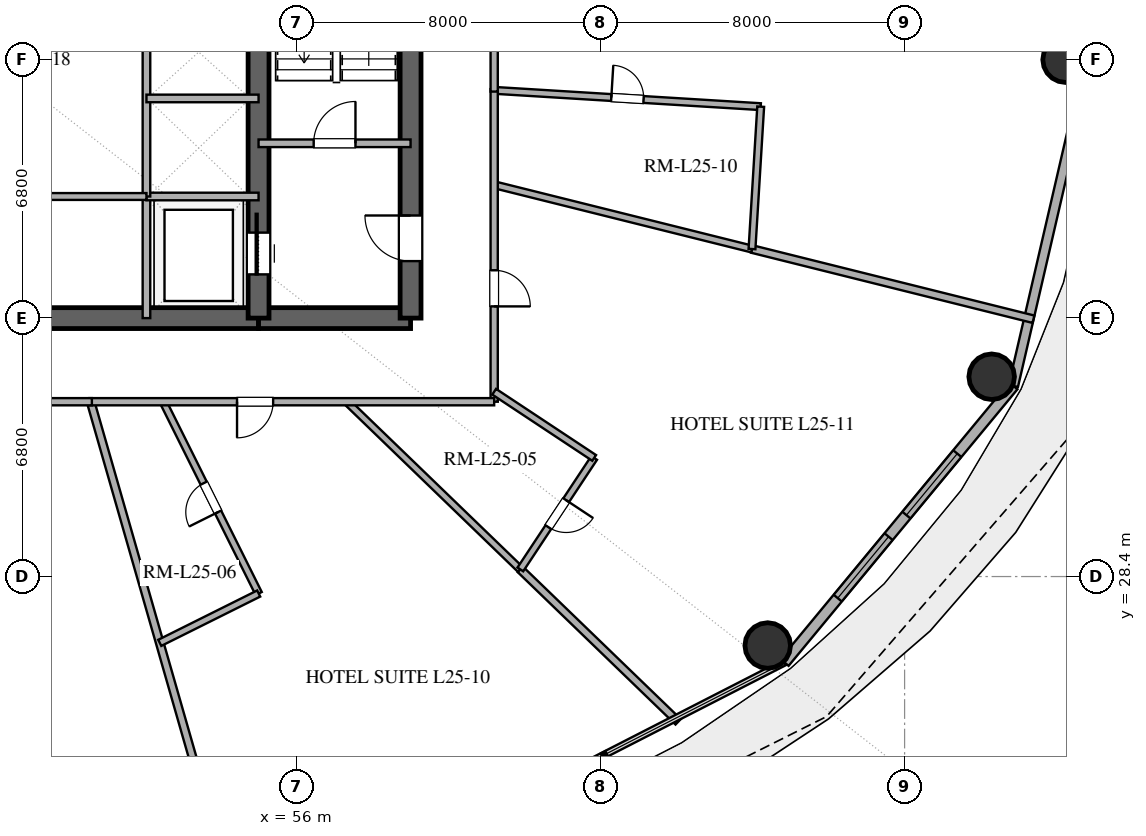
"""IFC4 building model, lengths in metres.
Left out: names, types, materials, properties, quantities, classifications, styles, units other than length and angle.
Written with IfcOpenShell. Run it as: python <this file> out.ifc"""

import sys

from ifc_helpers import new_model, si_unit, direction, frame, frame_2d, origin, origin_2d, place, context, subcontext, project, spatial, rectangle, hollow_circle, extrude, element, fill, save


model = new_model("IFC4")
c1 = context("Model", 3, precision=1e-05, world=origin(), true_north=direction((0.0, 1.0)))
c2 = subcontext(c1, "Body", "Model", "MODEL_VIEW")
j1 = project(units=[si_unit("LENGTHUNIT", "METRE"), si_unit("PLANEANGLEUNIT", "RADIAN")], contexts=[c1])
p1 = place(None, origin())
s1 = spatial("IfcSite", under=j1, at=p1, CompositionType="ELEMENT")
p2 = place(p1, origin())
s2 = spatial("IfcBuilding", under=s1, at=p2, CompositionType="ELEMENT")
p3 = place(p2, frame((0.0, 0.0, 102.0)))
s3 = spatial("IfcBuildingStorey", under=s2, at=p3, CompositionType="ELEMENT", Elevation=102.0)
p4 = place(p3, frame((41.0, 35.2, 0.0), z_axis=(0.0, 0.0, 1.0), x_axis=(1.0, 0.0, 0.0)))
e1 = element("IfcWall", 1, at=p4, inside=s3, PredefinedType="SHEAR", context=c2, shape_type="SweptSolid", body=[
    extrude(rectangle(XDim=14.0, YDim=0.55, at=frame_2d((7.0, 0.0))), origin(), (0.0, 0.0, 1.0), 3.38),
])
p5 = place(p4, frame((6.1, 0.0, 0.0)))
e2 = element("IfcOpeningElement", 2, at=p5, cuts=e1, PredefinedType="OPENING", context=c2, shape_type="SweptSolid", body=[
    extrude(rectangle(XDim=1.8, YDim=2.25, at=frame_2d((0.9, 1.125))), frame((0.0, 0.285, 0.0), z_axis=(0.0, -1.0, 0.0), x_axis=(1.0, 0.0, 0.0)), (0.0, 0.0, 1.0), 0.57),
])
p6 = place(p3, frame((55.0, 35.2, 0.0), z_axis=(0.0, 0.0, 1.0), x_axis=(1.0, 0.0, 0.0)))
e3 = element("IfcWall", 3, at=p6, inside=s3, PredefinedType="SHEAR", context=c2, shape_type="SweptSolid", body=[
    extrude(rectangle(XDim=4.0, YDim=0.55, at=frame_2d((2.0, 0.0))), origin(), (0.0, 0.0, 1.0), 3.38),
])
p7 = place(p3, frame((59.0, 35.2, 0.0), z_axis=(0.0, 0.0, 1.0), x_axis=(0.0, 1.0, 0.0)))
e4 = element("IfcWall", 4, at=p7, inside=s3, PredefinedType="SHEAR", context=c2, shape_type="SweptSolid", body=[
    extrude(rectangle(XDim=13.6, YDim=0.55, at=frame_2d((6.8, 0.0))), origin(), (0.0, 0.0, 1.0), 3.38),
])
p8 = place(p7, frame((1.5, 0.0, 0.0)))
e5 = element("IfcOpeningElement", 5, at=p8, cuts=e4, PredefinedType="OPENING", context=c2, shape_type="SweptSolid", body=[
    extrude(rectangle(XDim=1.2, YDim=2.15, at=frame_2d((0.6, 1.075))), frame((0.0, 0.285, 0.0), z_axis=(0.0, -1.0, 0.0), x_axis=(1.0, 0.0, 0.0)), (0.0, 0.0, 1.0), 0.57),
])
p9 = place(p3, frame((55.0, 35.2, 0.0), z_axis=(0.0, 0.0, 1.0), x_axis=(0.0, 1.0, 0.0)))
e6 = element("IfcWall", 6, at=p9, inside=s3, PredefinedType="SHEAR", context=c2, shape_type="SweptSolid", body=[
    extrude(rectangle(XDim=13.6, YDim=0.55, at=frame_2d((6.8, 0.0))), origin(), (0.0, 0.0, 1.0), 3.38),
])
p10 = place(p9, frame((1.15, 0.0, 0.0)))
e7 = element("IfcOpeningElement", 7, at=p10, cuts=e6, PredefinedType="OPENING", context=c2, shape_type="SweptSolid", body=[
    extrude(rectangle(XDim=1.1, YDim=2.2, at=frame_2d((0.55, 1.1))), frame((0.0, 0.285, 0.0), z_axis=(0.0, -1.0, 0.0), x_axis=(1.0, 0.0, 0.0)), (0.0, 0.0, 1.0), 0.57),
])
for number, where, z_axis, x_axis in (
    (8, (76.237, 42.0, 0.0), (0.0, 0.0, 1.0), (1.0, 0.0, 0.0)),
    (9, (68.398, 26.585, 0.0), (0.0, 0.0, 1.0), (1.0, 0.0, 0.0)),
    (10, (74.291, 33.657, 0.0), (0.0, 0.0, 1.0), (1.0, 0.0, 0.0)),
):
    element("IfcColumn", number, at=place(p3, frame(where, z_axis=z_axis, x_axis=x_axis)), inside=s3, PredefinedType="COLUMN", context=c2, shape_type="SweptSolid", body=[
        extrude(hollow_circle(Radius=0.6, WallThickness=0.032, at=origin_2d()), origin(), (0.0, 0.0, 1.0), 3.38),
    ])
p11 = place(p3, frame((76.849, 42.0, 0.0), z_axis=(0.0, 0.0, 1.0), x_axis=(-0.22558597182, 0.974223264616, 0.0)))
e11 = element("IfcWall", 11, at=p11, inside=s3, PredefinedType="SOLIDWALL", context=c2, shape_type="SweptSolid", body=[
    extrude(rectangle(XDim=8.811, YDim=0.28, at=frame_2d((4.405, 0.0))), origin(), (0.0, 0.0, 1.0), 3.38),
])
p12 = place(p11, frame((5.875, 0.0, 0.0)))
e12 = element("IfcOpeningElement", 12, at=p12, cuts=e11, PredefinedType="OPENING", context=c2, shape_type="SweptSolid", body=[
    extrude(rectangle(XDim=1.4, YDim=2.2, at=frame_2d((0.7, 1.1))), frame((0.0, 0.15, 0.0), z_axis=(0.0, -1.0, 0.0), x_axis=(1.0, 0.0, 0.0)), (0.0, 0.0, 1.0), 0.3),
])
p13 = place(p3, frame((68.84, 26.14, 0.0), z_axis=(0.0, 0.0, 1.0), x_axis=(0.637505817448, 0.770445541696, 0.0)))
e13 = element("IfcWall", 13, at=p13, inside=s3, PredefinedType="SOLIDWALL", context=c2, shape_type="SweptSolid", body=[
    extrude(rectangle(XDim=9.445, YDim=0.28, at=frame_2d((4.723, 0.0))), origin(), (0.0, 0.0, 1.0), 3.38),
])
p14 = place(p13, frame((2.197, 0.0, 0.85)))
e14 = element("IfcOpeningElement", 14, at=p14, cuts=e13, PredefinedType="OPENING", context=c2, shape_type="SweptSolid", body=[
    extrude(rectangle(XDim=2.1, YDim=2.2, at=frame_2d((1.05, 1.1))), frame((0.0, 0.15, 0.0), z_axis=(0.0, -1.0, 0.0), x_axis=(1.0, 0.0, 0.0)), (0.0, 0.0, 1.0), 0.3),
])
p15 = place(p13, frame((5.032, 0.0, 0.85)))
e15 = element("IfcOpeningElement", 15, at=p15, cuts=e13, PredefinedType="OPENING", context=c2, shape_type="SweptSolid", body=[
    extrude(rectangle(XDim=2.1, YDim=2.2, at=frame_2d((1.05, 1.1))), frame((0.0, 0.15, 0.0), z_axis=(0.0, -1.0, 0.0), x_axis=(1.0, 0.0, 0.0)), (0.0, 0.0, 1.0), 0.3),
])
p16 = place(p3, frame((74.861, 33.417, 0.0), z_axis=(0.0, 0.0, 1.0), x_axis=(0.22558597182, 0.974223264616, 0.0)))
e16 = element("IfcWall", 16, at=p16, inside=s3, PredefinedType="SOLIDWALL", context=c2, shape_type="SweptSolid", body=[
    extrude(rectangle(XDim=8.811, YDim=0.25, at=frame_2d((4.405, 0.0))), origin(), (0.0, 0.0, 1.0), 3.38),
])
p17 = place(p3, frame((55.0, 39.8, 0.0), z_axis=(0.0, 0.0, 1.0), x_axis=(1.0, 0.0, 0.0)))
e17 = element("IfcWall", 17, at=p17, inside=s3, PredefinedType="SOLIDWALL", context=c2, shape_type="SweptSolid", body=[
    extrude(rectangle(XDim=4.0, YDim=0.2, at=frame_2d((2.0, 0.0))), origin(), (0.0, 0.0, 1.0), 2.74),
])
p18 = place(p17, frame((1.45, 0.0, 0.0)))
e18 = element("IfcOpeningElement", 18, at=p18, cuts=e17, PredefinedType="OPENING", context=c2, shape_type="SweptSolid", body=[
    extrude(rectangle(XDim=1.1, YDim=2.15, at=frame_2d((0.55, 1.075))), frame((0.0, 0.11, 0.0), z_axis=(0.0, -1.0, 0.0), x_axis=(1.0, 0.0, 0.0)), (0.0, 0.0, 1.0), 0.22),
])
p19 = place(p3, frame((52.05, 35.2, 0.0), z_axis=(0.0, 0.0, 1.0), x_axis=(0.0, 1.0, 0.0)))
e19 = element("IfcWall", 19, at=p19, inside=s3, PredefinedType="SOLIDWALL", context=c2, shape_type="SweptSolid", body=[
    extrude(rectangle(XDim=3.2, YDim=0.2, at=frame_2d((1.6, 0.0))), origin(), (0.0, 0.0, 1.0), 2.74),
])
p20 = place(p3, frame((52.05, 38.4, 0.0), z_axis=(0.0, 0.0, 1.0), x_axis=(1.0, 0.0, 0.0)))
e20 = element("IfcWall", 20, at=p20, inside=s3, PredefinedType="SOLIDWALL", context=c2, shape_type="SweptSolid", body=[
    extrude(rectangle(XDim=2.95, YDim=0.2, at=frame_2d((1.475, 0.0))), origin(), (0.0, 0.0, 1.0), 2.74),
])
p21 = place(p3, frame((52.05, 38.4, 0.0), z_axis=(0.0, 0.0, 1.0), x_axis=(0.0, 1.0, 0.0)))
e21 = element("IfcWall", 21, at=p21, inside=s3, PredefinedType="SOLIDWALL", context=c2, shape_type="SweptSolid", body=[
    extrude(rectangle(XDim=10.4, YDim=0.2, at=frame_2d((5.2, 0.0))), origin(), (0.0, 0.0, 1.0), 2.74),
])
p22 = place(p21, frame((8.2, 0.0, 0.0)))
e22 = element("IfcOpeningElement", 22, at=p22, cuts=e21, PredefinedType="OPENING", context=c2, shape_type="SweptSolid", body=[
    extrude(rectangle(XDim=1.2, YDim=2.2, at=frame_2d((0.6, 1.1))), frame((0.0, 0.11, 0.0), z_axis=(0.0, -1.0, 0.0), x_axis=(1.0, 0.0, 0.0)), (0.0, 0.0, 1.0), 0.22),
])
p23 = place(p3, frame((52.05, 40.98, 0.0), z_axis=(0.0, 0.0, 1.0), x_axis=(1.0, 0.0, 0.0)))
e23 = element("IfcWall", 23, at=p23, inside=s3, PredefinedType="SOLIDWALL", context=c2, shape_type="SweptSolid", body=[
    extrude(rectangle(XDim=2.95, YDim=0.2, at=frame_2d((1.475, 0.0))), origin(), (0.0, 0.0, 1.0), 2.74),
])
p24 = place(p3, frame((49.2, 38.4, 0.0), z_axis=(0.0, 0.0, 1.0), x_axis=(1.0, 0.0, 0.0)))
e24 = element("IfcWall", 24, at=p24, inside=s3, PredefinedType="PLUMBINGWALL", context=c2, shape_type="SweptSolid", body=[
    extrude(rectangle(XDim=2.85, YDim=0.18, at=frame_2d((1.425, 0.0))), origin(), (0.0, 0.0, 1.0), 2.74),
])
p25 = place(p3, frame((75.391, 35.171, 0.0), z_axis=(0.0, 0.0, 1.0), x_axis=(-0.970302209845, 0.241895889938, 0.0)))
e25 = element("IfcWall", 25, at=p25, inside=s3, PredefinedType="PARTITIONING", context=c2, shape_type="SweptSolid", body=[
    extrude(rectangle(XDim=7.633, YDim=0.2, at=frame_2d((3.817, 0.0))), origin(), (0.0, 0.0, 1.0), 2.74),
])
p26 = place(p3, frame((61.2, 41.193, 0.0), z_axis=(0.0, 0.0, 1.0), x_axis=(0.998134708281, -0.061050013314, 0.0)))
e26 = element("IfcWall", 26, at=p26, inside=s3, PredefinedType="PLUMBINGWALL", context=c2, shape_type="SweptSolid", body=[
    extrude(rectangle(XDim=7.026, YDim=0.18, at=frame_2d((3.513, 0.0))), origin(), (0.0, 0.0, 1.0), 2.74),
])
p27 = place(p26, frame((3.088, 0.0, 0.0)))
e27 = element("IfcOpeningElement", 27, at=p27, cuts=e26, PredefinedType="OPENING", context=c2, shape_type="SweptSolid", body=[
    extrude(rectangle(XDim=0.85, YDim=2.1, at=frame_2d((0.425, 1.05))), frame((0.0, 0.1, 0.0), z_axis=(0.0, -1.0, 0.0), x_axis=(1.0, 0.0, 0.0)), (0.0, 0.0, 1.0), 0.2),
])
p28 = place(p3, frame((67.984, 37.017, 0.0), z_axis=(0.0, 0.0, 1.0), x_axis=(-0.970290206094, 0.241944034764, 0.0)))
e28 = element("IfcWall", 28, at=p28, inside=s3, PredefinedType="PLUMBINGWALL", context=c2, shape_type="SweptSolid", body=[
    extrude(rectangle(XDim=6.992, YDim=0.18, at=frame_2d((3.496, 0.0))), origin(), (0.0, 0.0, 1.0), 2.74),
])
p29 = place(p3, frame((50.581, 33.0, 0.0), z_axis=(0.0, 0.0, 1.0), x_axis=(0.275639731411, -0.961261014745, 0.0)))
e29 = element("IfcWall", 29, at=p29, inside=s3, PredefinedType="PARTITIONING", context=c2, shape_type="SweptSolid", body=[
    extrude(rectangle(XDim=13.126, YDim=0.2, at=frame_2d((6.563, 0.0))), origin(), (0.0, 0.0, 1.0), 2.74),
])
p30 = place(p3, frame((61.889, 28.587, 0.0), z_axis=(0.0, 0.0, 1.0), x_axis=(-0.719318009274, 0.694680935059, 0.0)))
e30 = element("IfcWall", 30, at=p30, inside=s3, PredefinedType="PLUMBINGWALL", context=c2, shape_type="SweptSolid", body=[
    extrude(rectangle(XDim=6.352, YDim=0.18, at=frame_2d((3.176, 0.0))), origin(), (0.0, 0.0, 1.0), 2.74),
])
p31 = place(p3, frame((66.041, 24.578, 0.0), z_axis=(0.0, 0.0, 1.0), x_axis=(-0.719370121813, 0.694626970281, 0.0)))
e31 = element("IfcWall", 31, at=p31, inside=s3, PredefinedType="PARTITIONING", context=c2, shape_type="SweptSolid", body=[
    extrude(rectangle(XDim=5.772, YDim=0.2, at=frame_2d((2.886, 0.0))), origin(), (0.0, 0.0, 1.0), 2.74),
])
p32 = place(p3, frame((55.003, 27.953, 0.0), z_axis=(0.0, 0.0, 1.0), x_axis=(-0.446174269641, 0.894946099556, 0.0)))
e32 = element("IfcWall", 32, at=p32, inside=s3, PredefinedType="PLUMBINGWALL", context=c2, shape_type="SweptSolid", body=[
    extrude(rectangle(XDim=5.639, YDim=0.18, at=frame_2d((2.82, 0.0))), origin(), (0.0, 0.0, 1.0), 2.74),
])
p33 = place(p32, frame((2.395, 0.0, 0.0)))
e33 = element("IfcOpeningElement", 33, at=p33, cuts=e32, PredefinedType="OPENING", context=c2, shape_type="SweptSolid", body=[
    extrude(rectangle(XDim=0.85, YDim=2.1, at=frame_2d((0.425, 1.05))), frame((0.0, 0.1, 0.0), z_axis=(0.0, -1.0, 0.0), x_axis=(1.0, 0.0, 0.0)), (0.0, 0.0, 1.0), 0.2),
])
p34 = place(p3, frame((61.2, 41.225, 0.0), z_axis=(0.0, 0.0, 1.0), x_axis=(0.0, -1.0, 0.0)))
e34 = element("IfcWall", 34, at=p34, inside=s3, PredefinedType="PARTITIONING", context=c2, shape_type="SweptSolid", body=[
    extrude(rectangle(XDim=8.225, YDim=0.19, at=frame_2d((4.112, 0.0))), origin(), (0.0, 0.0, 1.0), 2.74),
])
p35 = place(p34, frame((4.767, 0.0, 0.0)))
e35 = element("IfcOpeningElement", 35, at=p35, cuts=e34, PredefinedType="OPENING", context=c2, shape_type="SweptSolid", body=[
    extrude(rectangle(XDim=0.95, YDim=2.15, at=frame_2d((0.475, 1.075))), frame((0.0, 0.105, 0.0), z_axis=(0.0, -1.0, 0.0), x_axis=(1.0, 0.0, 0.0)), (0.0, 0.0, 1.0), 0.21),
])
p36 = place(p3, frame((61.2, 33.0, 0.0), z_axis=(0.0, 0.0, 1.0), x_axis=(-1.0, 0.0, 0.0)))
e36 = element("IfcWall", 36, at=p36, inside=s3, PredefinedType="PARTITIONING", context=c2, shape_type="SweptSolid", body=[
    extrude(rectangle(XDim=10.653, YDim=0.19, at=frame_2d((5.326, 0.0))), origin(), (0.0, 0.0, 1.0), 2.74),
])
p37 = place(p36, frame((5.816, 0.0, 0.0)))
e37 = element("IfcOpeningElement", 37, at=p37, cuts=e36, PredefinedType="OPENING", context=c2, shape_type="SweptSolid", body=[
    extrude(rectangle(XDim=0.95, YDim=2.15, at=frame_2d((0.475, 1.075))), frame((0.0, 0.105, 0.0), z_axis=(0.0, -1.0, 0.0), x_axis=(1.0, 0.0, 0.0)), (0.0, 0.0, 1.0), 0.21),
])
p38 = place(p3, frame((61.2, 51.0, 0.0), z_axis=(0.0, 0.0, 1.0), x_axis=(0.0, -1.0, 0.0)))
e38 = element("IfcWall", 38, at=p38, inside=s3, PredefinedType="PARTITIONING", context=c2, shape_type="SweptSolid", body=[
    extrude(rectangle(XDim=9.839, YDim=0.19, at=frame_2d((4.92, 0.0))), origin(), (0.0, 0.0, 1.0), 2.74),
])
p39 = place(p38, frame((7.035, 0.0, 0.0)))
e39 = element("IfcOpeningElement", 39, at=p39, cuts=e38, PredefinedType="OPENING", context=c2, shape_type="SweptSolid", body=[
    extrude(rectangle(XDim=0.95, YDim=2.15, at=frame_2d((0.475, 1.075))), frame((0.0, 0.105, 0.0), z_axis=(0.0, -1.0, 0.0), x_axis=(1.0, 0.0, 0.0)), (0.0, 0.0, 1.0), 0.21),
])
p40 = place(p3, frame((68.213, 40.764, 0.0), z_axis=(0.0, 0.0, 1.0), x_axis=(-0.061013519028, -0.998136939751, 0.0)))
e40 = element("IfcWall", 40, at=p40, inside=s3, PredefinedType="PLUMBINGWALL", context=c2, shape_type="SweptSolid", body=[
    extrude(rectangle(XDim=3.753, YDim=0.18, at=frame_2d((1.877, 0.0))), origin(), (0.0, 0.0, 1.0), 2.74),
])
p41 = place(p3, frame((63.831, 31.521, 0.0), z_axis=(0.0, 0.0, 1.0), x_axis=(-0.551959146688, -0.833871153349, 0.0)))
e41 = element("IfcWall", 41, at=p41, inside=s3, PredefinedType="PLUMBINGWALL", context=c2, shape_type="SweptSolid", body=[
    extrude(rectangle(XDim=3.519, YDim=0.18, at=frame_2d((1.759, 0.0))), origin(), (0.0, 0.0, 1.0), 2.74),
])
p42 = place(p41, frame((1.334, 0.0, 0.0)))
e42 = element("IfcOpeningElement", 42, at=p42, cuts=e41, PredefinedType="OPENING", context=c2, shape_type="SweptSolid", body=[
    extrude(rectangle(XDim=0.85, YDim=2.1, at=frame_2d((0.425, 1.05))), frame((0.0, 0.1, 0.0), z_axis=(0.0, -1.0, 0.0), x_axis=(1.0, 0.0, 0.0)), (0.0, 0.0, 1.0), 0.2),
])
p43 = place(p3, frame((50.614, 33.0, 0.0), z_axis=(0.0, 0.0, 1.0), x_axis=(-1.0, 0.0, 0.0)))
e43 = element("IfcWall", 43, at=p43, inside=s3, PredefinedType="PARTITIONING", context=c2, shape_type="SweptSolid", body=[
    extrude(rectangle(XDim=3.197, YDim=0.19, at=frame_2d((1.598, 0.0))), origin(), (0.0, 0.0, 1.0), 2.74),
])
p44 = place(p43, frame((1.123, 0.0, 0.0)))
e44 = element("IfcOpeningElement", 44, at=p44, cuts=e43, PredefinedType="OPENING", context=c2, shape_type="SweptSolid", body=[
    extrude(rectangle(XDim=0.95, YDim=2.15, at=frame_2d((0.475, 1.075))), frame((0.0, 0.105, 0.0), z_axis=(0.0, -1.0, 0.0), x_axis=(1.0, 0.0, 0.0)), (0.0, 0.0, 1.0), 0.21),
])
p45 = place(p3, frame((61.2, 33.263, 0.0), z_axis=(0.0, 0.0, 1.0), x_axis=(0.833855219674, -0.5519832177, 0.0)))
e45 = element("IfcWall", 45, at=p45, inside=s3, PredefinedType="PLUMBINGWALL", context=c2, shape_type="SweptSolid", body=[
    extrude(rectangle(XDim=3.155, YDim=0.18, at=frame_2d((1.578, 0.0))), origin(), (0.0, 0.0, 1.0), 2.74),
])
p46 = place(p3, frame((52.4, 26.655, 0.0), z_axis=(0.0, 0.0, 1.0), x_axis=(0.894913437672, 0.446239777558, 0.0)))
e46 = element("IfcWall", 46, at=p46, inside=s3, PredefinedType="PLUMBINGWALL", context=c2, shape_type="SweptSolid", body=[
    extrude(rectangle(XDim=2.909, YDim=0.18, at=frame_2d((1.455, 0.0))), origin(), (0.0, 0.0, 1.0), 2.74),
])
p47 = place(p14, origin())
e47 = element("IfcWindow", 47, at=p47, inside=s3, PartitioningType="SINGLE_PANEL", PredefinedType="WINDOW", context=c2, shape_type="SweptSolid", body=[
    extrude(rectangle(XDim=2.1, YDim=2.2, at=frame_2d((1.05, 1.1))), frame((0.0, 0.03, 0.0), z_axis=(0.0, -1.0, 0.0), x_axis=(1.0, 0.0, 0.0)), (0.0, 0.0, 1.0), 0.06),
])
fill(e14, e47)
p48 = place(p15, origin())
e48 = element("IfcWindow", 48, at=p48, inside=s3, PartitioningType="SINGLE_PANEL", PredefinedType="WINDOW", context=c2, shape_type="SweptSolid", body=[
    extrude(rectangle(XDim=2.1, YDim=2.2, at=frame_2d((1.05, 1.1))), frame((0.0, 0.03, 0.0), z_axis=(0.0, -1.0, 0.0), x_axis=(1.0, 0.0, 0.0)), (0.0, 0.0, 1.0), 0.06),
])
fill(e15, e48)
p49 = place(p10, origin())
e49 = element("IfcDoor", 49, at=p49, inside=s3, OperationType="SLIDING_TO_RIGHT", PredefinedType="DOOR", context=c2, shape_type="SweptSolid", body=[
    extrude(rectangle(XDim=1.1, YDim=2.2, at=frame_2d((0.55, 1.1))), frame((0.0, 0.025, 0.0), z_axis=(0.0, -1.0, 0.0), x_axis=(1.0, 0.0, 0.0)), (0.0, 0.0, 1.0), 0.05),
])
fill(e7, e49)
p50 = place(p8, origin())
e50 = element("IfcDoor", 50, at=p50, inside=s3, OperationType="SINGLE_SWING_RIGHT", PredefinedType="DOOR", context=c2, shape_type="SweptSolid", body=[
    extrude(rectangle(XDim=1.2, YDim=2.15, at=frame_2d((0.6, 1.075))), frame((0.0, 0.025, 0.0), z_axis=(0.0, -1.0, 0.0), x_axis=(1.0, 0.0, 0.0)), (0.0, 0.0, 1.0), 0.05),
])
fill(e5, e50)
p51 = place(p18, origin())
e51 = element("IfcDoor", 51, at=p51, inside=s3, OperationType="SINGLE_SWING_RIGHT", PredefinedType="DOOR", context=c2, shape_type="SweptSolid", body=[
    extrude(rectangle(XDim=1.1, YDim=2.15, at=frame_2d((0.55, 1.075))), frame((0.0, 0.025, 0.0), z_axis=(0.0, -1.0, 0.0), x_axis=(1.0, 0.0, 0.0)), (0.0, 0.0, 1.0), 0.05),
])
fill(e18, e51)
p52 = place(p27, origin())
e52 = element("IfcDoor", 52, at=p52, inside=s3, OperationType="SINGLE_SWING_LEFT", PredefinedType="DOOR", context=c2, shape_type="SweptSolid", body=[
    extrude(rectangle(XDim=0.85, YDim=2.1, at=frame_2d((0.425, 1.05))), frame((0.0, 0.025, 0.0), z_axis=(0.0, -1.0, 0.0), x_axis=(1.0, 0.0, 0.0)), (0.0, 0.0, 1.0), 0.05),
])
fill(e27, e52)
p53 = place(p33, origin())
e53 = element("IfcDoor", 53, at=p53, inside=s3, OperationType="SINGLE_SWING_LEFT", PredefinedType="DOOR", context=c2, shape_type="SweptSolid", body=[
    extrude(rectangle(XDim=0.85, YDim=2.1, at=frame_2d((0.425, 1.05))), frame((0.0, 0.025, 0.0), z_axis=(0.0, -1.0, 0.0), x_axis=(1.0, 0.0, 0.0)), (0.0, 0.0, 1.0), 0.05),
])
fill(e33, e53)
p54 = place(p35, origin())
e54 = element("IfcDoor", 54, at=p54, inside=s3, OperationType="SINGLE_SWING_RIGHT", PredefinedType="DOOR", context=c2, shape_type="SweptSolid", body=[
    extrude(rectangle(XDim=0.95, YDim=2.15, at=frame_2d((0.475, 1.075))), frame((0.0, 0.025, 0.0), z_axis=(0.0, -1.0, 0.0), x_axis=(1.0, 0.0, 0.0)), (0.0, 0.0, 1.0), 0.05),
])
fill(e35, e54)
p55 = place(p37, origin())
e55 = element("IfcDoor", 55, at=p55, inside=s3, OperationType="SINGLE_SWING_RIGHT", PredefinedType="DOOR", context=c2, shape_type="SweptSolid", body=[
    extrude(rectangle(XDim=0.95, YDim=2.15, at=frame_2d((0.475, 1.075))), frame((0.0, 0.025, 0.0), z_axis=(0.0, -1.0, 0.0), x_axis=(1.0, 0.0, 0.0)), (0.0, 0.0, 1.0), 0.05),
])
fill(e37, e55)
p56 = place(p42, origin())
e56 = element("IfcDoor", 56, at=p56, inside=s3, OperationType="SINGLE_SWING_LEFT", PredefinedType="DOOR", context=c2, shape_type="SweptSolid", body=[
    extrude(rectangle(XDim=0.85, YDim=2.1, at=frame_2d((0.425, 1.05))), frame((0.0, 0.025, 0.0), z_axis=(0.0, -1.0, 0.0), x_axis=(1.0, 0.0, 0.0)), (0.0, 0.0, 1.0), 0.05),
])
fill(e42, e56)
save(model, sys.argv[1])
